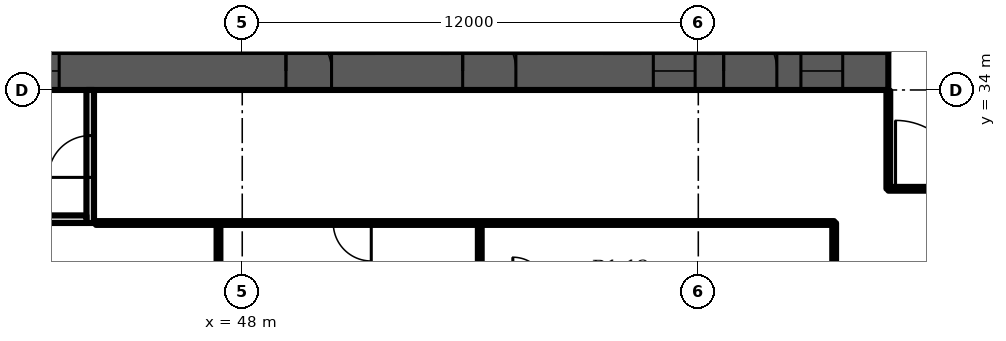
"""IFC4 building model, lengths in metres.
Left out: names, types, materials, properties, quantities, classifications, styles, units other than length and angle.
Written with IfcOpenShell. Run it as: python <this file> out.ifc"""

import sys

from ifc_helpers import new_model, si_unit, direction, frame, frame_2d, origin, place, context, subcontext, project, spatial, rectangle, extrude, element, fill, save


model = new_model("IFC4")
c1 = context("Model", 3, precision=1e-05, world=origin(), true_north=direction((0.0, 1.0)))
c2 = subcontext(c1, "Body", "Model", "MODEL_VIEW")
j1 = project(units=[si_unit("LENGTHUNIT", "METRE"), si_unit("PLANEANGLEUNIT", "RADIAN")], contexts=[c1])
p1 = place(None, origin())
s1 = spatial("IfcSite", under=j1, at=p1, CompositionType="ELEMENT")
p2 = place(p1, origin())
s2 = spatial("IfcBuilding", under=s1, at=p2, CompositionType="ELEMENT")
p3 = place(p2, frame((0.0, 0.0, 96.7)))
s3 = spatial("IfcBuildingStorey", under=s2, at=p3, CompositionType="ELEMENT", Elevation=96.7)
p4 = place(p3, frame((16.0, 34.5, 0.0), z_axis=(0.0, 0.0, 1.0), x_axis=(1.0, 0.0, 0.0)))
e1 = element("IfcWall", 1, at=p4, inside=s3, PredefinedType="SHEAR", context=c2, shape_type="SweptSolid", body=[
    extrude(rectangle(XDim=49.0, YDim=1.0, at=frame_2d((24.5, 0.0))), origin(), (0.0, 0.0, 1.0), 3.6),
])
p5 = place(p4, frame((1.2, 0.0, 0.0)))
e2 = element("IfcOpeningElement", 2, at=p5, cuts=e1, PredefinedType="OPENING", context=c2, shape_type="SweptSolid", body=[
    extrude(rectangle(XDim=1.1, YDim=2.1, at=frame_2d((0.55, 1.05))), frame((0.0, 0.51, 0.0), z_axis=(0.0, -1.0, 0.0), x_axis=(1.0, 0.0, 0.0)), (0.0, 0.0, 1.0), 1.02),
])
p6 = place(p4, frame((5.083, 0.0, 0.0)))
e3 = element("IfcOpeningElement", 3, at=p6, cuts=e1, PredefinedType="OPENING", context=c2, shape_type="SweptSolid", body=[
    extrude(rectangle(XDim=1.1, YDim=2.1, at=frame_2d((0.55, 1.05))), frame((0.0, 0.51, 0.0), z_axis=(0.0, -1.0, 0.0), x_axis=(1.0, 0.0, 0.0)), (0.0, 0.0, 1.0), 1.02),
])
p7 = place(p4, frame((2.933, 0.0, 0.0)))
e4 = element("IfcOpeningElement", 4, at=p7, cuts=e1, PredefinedType="OPENING", context=c2, shape_type="SweptSolid", body=[
    extrude(rectangle(XDim=1.4, YDim=2.1, at=frame_2d((0.7, 1.05))), frame((0.0, 0.51, 0.0), z_axis=(0.0, -1.0, 0.0), x_axis=(1.0, 0.0, 0.0)), (0.0, 0.0, 1.0), 1.02),
])
p8 = place(p4, frame((7.65, 0.0, 0.0)))
e5 = element("IfcOpeningElement", 5, at=p8, cuts=e1, PredefinedType="OPENING", context=c2, shape_type="SweptSolid", body=[
    extrude(rectangle(XDim=1.2, YDim=2.1, at=frame_2d((0.6, 1.05))), frame((0.0, 0.51, 0.0), z_axis=(0.0, -1.0, 0.0), x_axis=(1.0, 0.0, 0.0)), (0.0, 0.0, 1.0), 1.02),
])
p9 = place(p4, frame((14.817, 0.0, 0.0)))
e6 = element("IfcOpeningElement", 6, at=p9, cuts=e1, PredefinedType="OPENING", context=c2, shape_type="SweptSolid", body=[
    extrude(rectangle(XDim=1.1, YDim=2.1, at=frame_2d((0.55, 1.05))), frame((0.0, 0.51, 0.0), z_axis=(0.0, -1.0, 0.0), x_axis=(1.0, 0.0, 0.0)), (0.0, 0.0, 1.0), 1.02),
])
p10 = place(p4, frame((19.083, 0.0, 0.0)))
e7 = element("IfcOpeningElement", 7, at=p10, cuts=e1, PredefinedType="OPENING", context=c2, shape_type="SweptSolid", body=[
    extrude(rectangle(XDim=1.1, YDim=2.1, at=frame_2d((0.55, 1.05))), frame((0.0, 0.51, 0.0), z_axis=(0.0, -1.0, 0.0), x_axis=(1.0, 0.0, 0.0)), (0.0, 0.0, 1.0), 1.02),
])
p11 = place(p4, frame((16.8, 0.0, 0.0)))
e8 = element("IfcOpeningElement", 8, at=p11, cuts=e1, PredefinedType="OPENING", context=c2, shape_type="SweptSolid", body=[
    extrude(rectangle(XDim=1.4, YDim=2.1, at=frame_2d((0.7, 1.05))), frame((0.0, 0.51, 0.0), z_axis=(0.0, -1.0, 0.0), x_axis=(1.0, 0.0, 0.0)), (0.0, 0.0, 1.0), 1.02),
])
p12 = place(p4, frame((21.817, 0.0, 0.0)))
e9 = element("IfcOpeningElement", 9, at=p12, cuts=e1, PredefinedType="OPENING", context=c2, shape_type="SweptSolid", body=[
    extrude(rectangle(XDim=1.1, YDim=2.1, at=frame_2d((0.55, 1.05))), frame((0.0, 0.51, 0.0), z_axis=(0.0, -1.0, 0.0), x_axis=(1.0, 0.0, 0.0)), (0.0, 0.0, 1.0), 1.02),
])
p13 = place(p4, frame((26.083, 0.0, 0.0)))
e10 = element("IfcOpeningElement", 10, at=p13, cuts=e1, PredefinedType="OPENING", context=c2, shape_type="SweptSolid", body=[
    extrude(rectangle(XDim=1.1, YDim=2.1, at=frame_2d((0.55, 1.05))), frame((0.0, 0.51, 0.0), z_axis=(0.0, -1.0, 0.0), x_axis=(1.0, 0.0, 0.0)), (0.0, 0.0, 1.0), 1.02),
])
p14 = place(p4, frame((33.15, 0.0, 0.0)))
e11 = element("IfcOpeningElement", 11, at=p14, cuts=e1, PredefinedType="OPENING", context=c2, shape_type="SweptSolid", body=[
    extrude(rectangle(XDim=1.2, YDim=2.1, at=frame_2d((0.6, 1.05))), frame((0.0, 0.51, 0.0), z_axis=(0.0, -1.0, 0.0), x_axis=(1.0, 0.0, 0.0)), (0.0, 0.0, 1.0), 1.02),
])
p15 = place(p4, frame((37.8, 0.0, 0.0)))
e12 = element("IfcOpeningElement", 12, at=p15, cuts=e1, PredefinedType="OPENING", context=c2, shape_type="SweptSolid", body=[
    extrude(rectangle(XDim=1.4, YDim=2.1, at=frame_2d((0.7, 1.05))), frame((0.0, 0.51, 0.0), z_axis=(0.0, -1.0, 0.0), x_axis=(1.0, 0.0, 0.0)), (0.0, 0.0, 1.0), 1.02),
])
p16 = place(p4, frame((42.817, 0.0, 0.0)))
e13 = element("IfcOpeningElement", 13, at=p16, cuts=e1, PredefinedType="OPENING", context=c2, shape_type="SweptSolid", body=[
    extrude(rectangle(XDim=1.1, YDim=2.1, at=frame_2d((0.55, 1.05))), frame((0.0, 0.51, 0.0), z_axis=(0.0, -1.0, 0.0), x_axis=(1.0, 0.0, 0.0)), (0.0, 0.0, 1.0), 1.02),
])
p17 = place(p4, frame((46.7, 0.0, 0.0)))
e14 = element("IfcOpeningElement", 14, at=p17, cuts=e1, PredefinedType="OPENING", context=c2, shape_type="SweptSolid", body=[
    extrude(rectangle(XDim=1.1, YDim=2.1, at=frame_2d((0.55, 1.05))), frame((0.0, 0.51, 0.0), z_axis=(0.0, -1.0, 0.0), x_axis=(1.0, 0.0, 0.0)), (0.0, 0.0, 1.0), 1.02),
])
p18 = place(p4, frame((44.667, 0.0, 0.0)))
e15 = element("IfcOpeningElement", 15, at=p18, cuts=e1, PredefinedType="OPENING", context=c2, shape_type="SweptSolid", body=[
    extrude(rectangle(XDim=1.4, YDim=2.1, at=frame_2d((0.7, 1.05))), frame((0.0, 0.51, 0.0), z_axis=(0.0, -1.0, 0.0), x_axis=(1.0, 0.0, 0.0)), (0.0, 0.0, 1.0), 1.02),
])
p19 = place(p3, frame((44.0, 30.5, 0.0), z_axis=(0.0, 0.0, 1.0), x_axis=(0.0, 1.0, 0.0)))
e16 = element("IfcWall", 16, at=p19, inside=s3, PredefinedType="PARTITIONING", context=c2, shape_type="SweptSolid", body=[
    extrude(rectangle(XDim=3.5, YDim=0.2, at=frame_2d((1.75, 0.0))), origin(), (0.0, 0.0, 1.0), 3.2),
])
p20 = place(p19, frame((1.2, 0.0, 0.0)))
e17 = element("IfcOpeningElement", 17, at=p20, cuts=e16, PredefinedType="OPENING", context=c2, shape_type="SweptSolid", body=[
    extrude(rectangle(XDim=1.1, YDim=2.1, at=frame_2d((0.55, 1.05))), frame((0.0, 0.11, 0.0), z_axis=(0.0, -1.0, 0.0), x_axis=(1.0, 0.0, 0.0)), (0.0, 0.0, 1.0), 0.22),
])
p21 = place(p3, frame((41.1, 30.6, 0.0), z_axis=(0.0, 0.0, 1.0), x_axis=(1.0, 0.0, 0.0)))
e18 = element("IfcWall", 18, at=p21, inside=s3, PredefinedType="PARTITIONING", context=c2, shape_type="SweptSolid", body=[
    extrude(rectangle(XDim=2.8, YDim=0.2, at=frame_2d((1.4, 0.0))), origin(), (0.0, 0.0, 1.0), 3.2),
])
p22 = place(p3, frame((47.375, 17.095, 0.0), z_axis=(0.0, 0.0, 1.0), x_axis=(0.0, 1.0, 0.0)))
e19 = element("IfcWall", 19, at=p22, inside=s3, PredefinedType="PARTITIONING", context=c2, shape_type="SweptSolid", body=[
    extrude(rectangle(XDim=13.405, YDim=0.1, at=frame_2d((6.703, 0.0))), origin(), (0.0, 0.0, 1.0), 3.2),
])
p23 = place(p3, frame((54.25, 17.095, 0.0), z_axis=(0.0, 0.0, 1.0), x_axis=(0.0, 1.0, 0.0)))
e20 = element("IfcWall", 20, at=p23, inside=s3, PredefinedType="PARTITIONING", context=c2, shape_type="SweptSolid", body=[
    extrude(rectangle(XDim=13.395, YDim=0.1, at=frame_2d((6.698, 0.0))), origin(), (0.0, 0.0, 1.0), 3.2),
])
p24 = place(p3, frame((63.575, 29.075, 0.0), z_axis=(0.0, 0.0, 1.0), x_axis=(0.0, 1.0, 0.0)))
e21 = element("IfcWall", 21, at=p24, inside=s3, PredefinedType="PARTITIONING", context=c2, shape_type="SweptSolid", body=[
    extrude(rectangle(XDim=1.425, YDim=0.1, at=frame_2d((0.712, 0.0))), origin(), (0.0, 0.0, 1.0), 3.2),
])
p25 = place(p3, frame((65.0, 31.4, 0.0), z_axis=(0.0, 0.0, 1.0), x_axis=(0.0, 1.0, 0.0)))
e22 = element("IfcWall", 22, at=p25, inside=s3, PredefinedType="PARTITIONING", context=c2, shape_type="SweptSolid", body=[
    extrude(rectangle(XDim=2.58, YDim=0.1, at=frame_2d((1.29, 0.0))), origin(), (0.0, 0.0, 1.0), 3.2),
])
p26 = place(p3, frame((65.0, 31.4, 0.0), z_axis=(0.0, 0.0, 1.0), x_axis=(1.0, 0.0, 0.0)))
e23 = element("IfcWall", 23, at=p26, inside=s3, PredefinedType="PARTITIONING", context=c2, shape_type="SweptSolid", body=[
    extrude(rectangle(XDim=4.69, YDim=0.1, at=frame_2d((2.345, 0.0))), origin(), (0.0, 0.0, 1.0), 3.2),
])
p27 = place(p26, frame((0.19, 0.0, 0.0)))
e24 = element("IfcOpeningElement", 24, at=p27, cuts=e23, PredefinedType="OPENING", context=c2, shape_type="SweptSolid", body=[
    extrude(rectangle(XDim=1.8, YDim=2.1, at=frame_2d((0.9, 1.05))), frame((0.0, 0.06, 0.0), z_axis=(0.0, -1.0, 0.0), x_axis=(1.0, 0.0, 0.0)), (0.0, 0.0, 1.0), 0.12),
])
p28 = place(p3, frame((44.15, 30.5, 0.0), z_axis=(0.0, 0.0, 1.0), x_axis=(1.0, 0.0, 0.0)))
e25 = element("IfcWall", 25, at=p28, inside=s3, PredefinedType="PARTITIONING", context=c2, shape_type="SweptSolid", body=[
    extrude(rectangle(XDim=19.425, YDim=0.1, at=frame_2d((9.712, 0.0))), origin(), (0.0, 0.0, 1.0), 3.2),
])
p29 = place(p28, frame((6.245, 0.0, 0.0)))
e26 = element("IfcOpeningElement", 26, at=p29, cuts=e25, PredefinedType="OPENING", context=c2, shape_type="SweptSolid", body=[
    extrude(rectangle(XDim=1.0, YDim=2.1, at=frame_2d((0.5, 1.05))), frame((0.0, 0.06, 0.0), z_axis=(0.0, -1.0, 0.0), x_axis=(1.0, 0.0, 0.0)), (0.0, 0.0, 1.0), 0.12),
])
p30 = place(p13, origin())
e27 = element("IfcDoor", 27, at=p30, inside=s3, OperationType="DOUBLE_DOOR_SLIDING", PredefinedType="DOOR", context=c2, shape_type="SweptSolid", body=[
    extrude(rectangle(XDim=1.1, YDim=2.1, at=frame_2d((0.55, 1.05))), frame((0.0, 0.025, 0.0), z_axis=(0.0, -1.0, 0.0), x_axis=(1.0, 0.0, 0.0)), (0.0, 0.0, 1.0), 0.05),
])
fill(e10, e27)
p31 = place(p14, origin())
e28 = element("IfcDoor", 28, at=p31, inside=s3, OperationType="SINGLE_SWING_LEFT", PredefinedType="DOOR", context=c2, shape_type="SweptSolid", body=[
    extrude(rectangle(XDim=1.2, YDim=2.1, at=frame_2d((0.6, 1.05))), frame((0.0, 0.025, 0.0), z_axis=(0.0, -1.0, 0.0), x_axis=(1.0, 0.0, 0.0)), (0.0, 0.0, 1.0), 0.05),
])
fill(e11, e28)
p32 = place(p15, origin())
e29 = element("IfcDoor", 29, at=p32, inside=s3, OperationType="DOUBLE_DOOR_SINGLE_SWING", PredefinedType="DOOR", context=c2, shape_type="SweptSolid", body=[
    extrude(rectangle(XDim=1.4, YDim=2.1, at=frame_2d((0.7, 1.05))), frame((0.0, 0.025, 0.0), z_axis=(0.0, -1.0, 0.0), x_axis=(1.0, 0.0, 0.0)), (0.0, 0.0, 1.0), 0.05),
])
fill(e12, e29)
p33 = place(p16, origin())
e30 = element("IfcDoor", 30, at=p33, inside=s3, OperationType="DOUBLE_DOOR_SLIDING", PredefinedType="DOOR", context=c2, shape_type="SweptSolid", body=[
    extrude(rectangle(XDim=1.1, YDim=2.1, at=frame_2d((0.55, 1.05))), frame((0.0, 0.025, 0.0), z_axis=(0.0, -1.0, 0.0), x_axis=(1.0, 0.0, 0.0)), (0.0, 0.0, 1.0), 0.05),
])
fill(e13, e30)
p34 = place(p17, origin())
e31 = element("IfcDoor", 31, at=p34, inside=s3, OperationType="DOUBLE_DOOR_SLIDING", PredefinedType="DOOR", context=c2, shape_type="SweptSolid", body=[
    extrude(rectangle(XDim=1.1, YDim=2.1, at=frame_2d((0.55, 1.05))), frame((0.0, 0.025, 0.0), z_axis=(0.0, -1.0, 0.0), x_axis=(1.0, 0.0, 0.0)), (0.0, 0.0, 1.0), 0.05),
])
fill(e14, e31)
p35 = place(p18, origin())
e32 = element("IfcDoor", 32, at=p35, inside=s3, OperationType="DOUBLE_DOOR_SINGLE_SWING", PredefinedType="DOOR", context=c2, shape_type="SweptSolid", body=[
    extrude(rectangle(XDim=1.4, YDim=2.1, at=frame_2d((0.7, 1.05))), frame((0.0, 0.025, 0.0), z_axis=(0.0, -1.0, 0.0), x_axis=(1.0, 0.0, 0.0)), (0.0, 0.0, 1.0), 0.05),
])
fill(e15, e32)
p36 = place(p20, origin())
e33 = element("IfcDoor", 33, at=p36, inside=s3, OperationType="SINGLE_SWING_LEFT", PredefinedType="DOOR", context=c2, shape_type="SweptSolid", body=[
    extrude(rectangle(XDim=1.1, YDim=2.1, at=frame_2d((0.55, 1.05))), frame((0.0, 0.025, 0.0), z_axis=(0.0, -1.0, 0.0), x_axis=(1.0, 0.0, 0.0)), (0.0, 0.0, 1.0), 0.05),
])
fill(e17, e33)
p37 = place(p29, origin())
e34 = element("IfcDoor", 34, at=p37, inside=s3, OperationType="SINGLE_SWING_RIGHT", PredefinedType="DOOR", context=c2, shape_type="SweptSolid", body=[
    extrude(rectangle(XDim=1.0, YDim=2.1, at=frame_2d((0.5, 1.05))), frame((0.0, 0.025, 0.0), z_axis=(0.0, -1.0, 0.0), x_axis=(1.0, 0.0, 0.0)), (0.0, 0.0, 1.0), 0.05),
])
fill(e26, e34)
p38 = place(p27, origin())
e35 = element("IfcDoor", 35, at=p38, inside=s3, OperationType="DOUBLE_DOOR_SINGLE_SWING", PredefinedType="DOOR", context=c2, shape_type="SweptSolid", body=[
    extrude(rectangle(XDim=1.8, YDim=2.1, at=frame_2d((0.9, 1.05))), frame((0.0, 0.025, 0.0), z_axis=(0.0, -1.0, 0.0), x_axis=(1.0, 0.0, 0.0)), (0.0, 0.0, 1.0), 0.05),
])
fill(e24, e35)
save(model, sys.argv[1])
